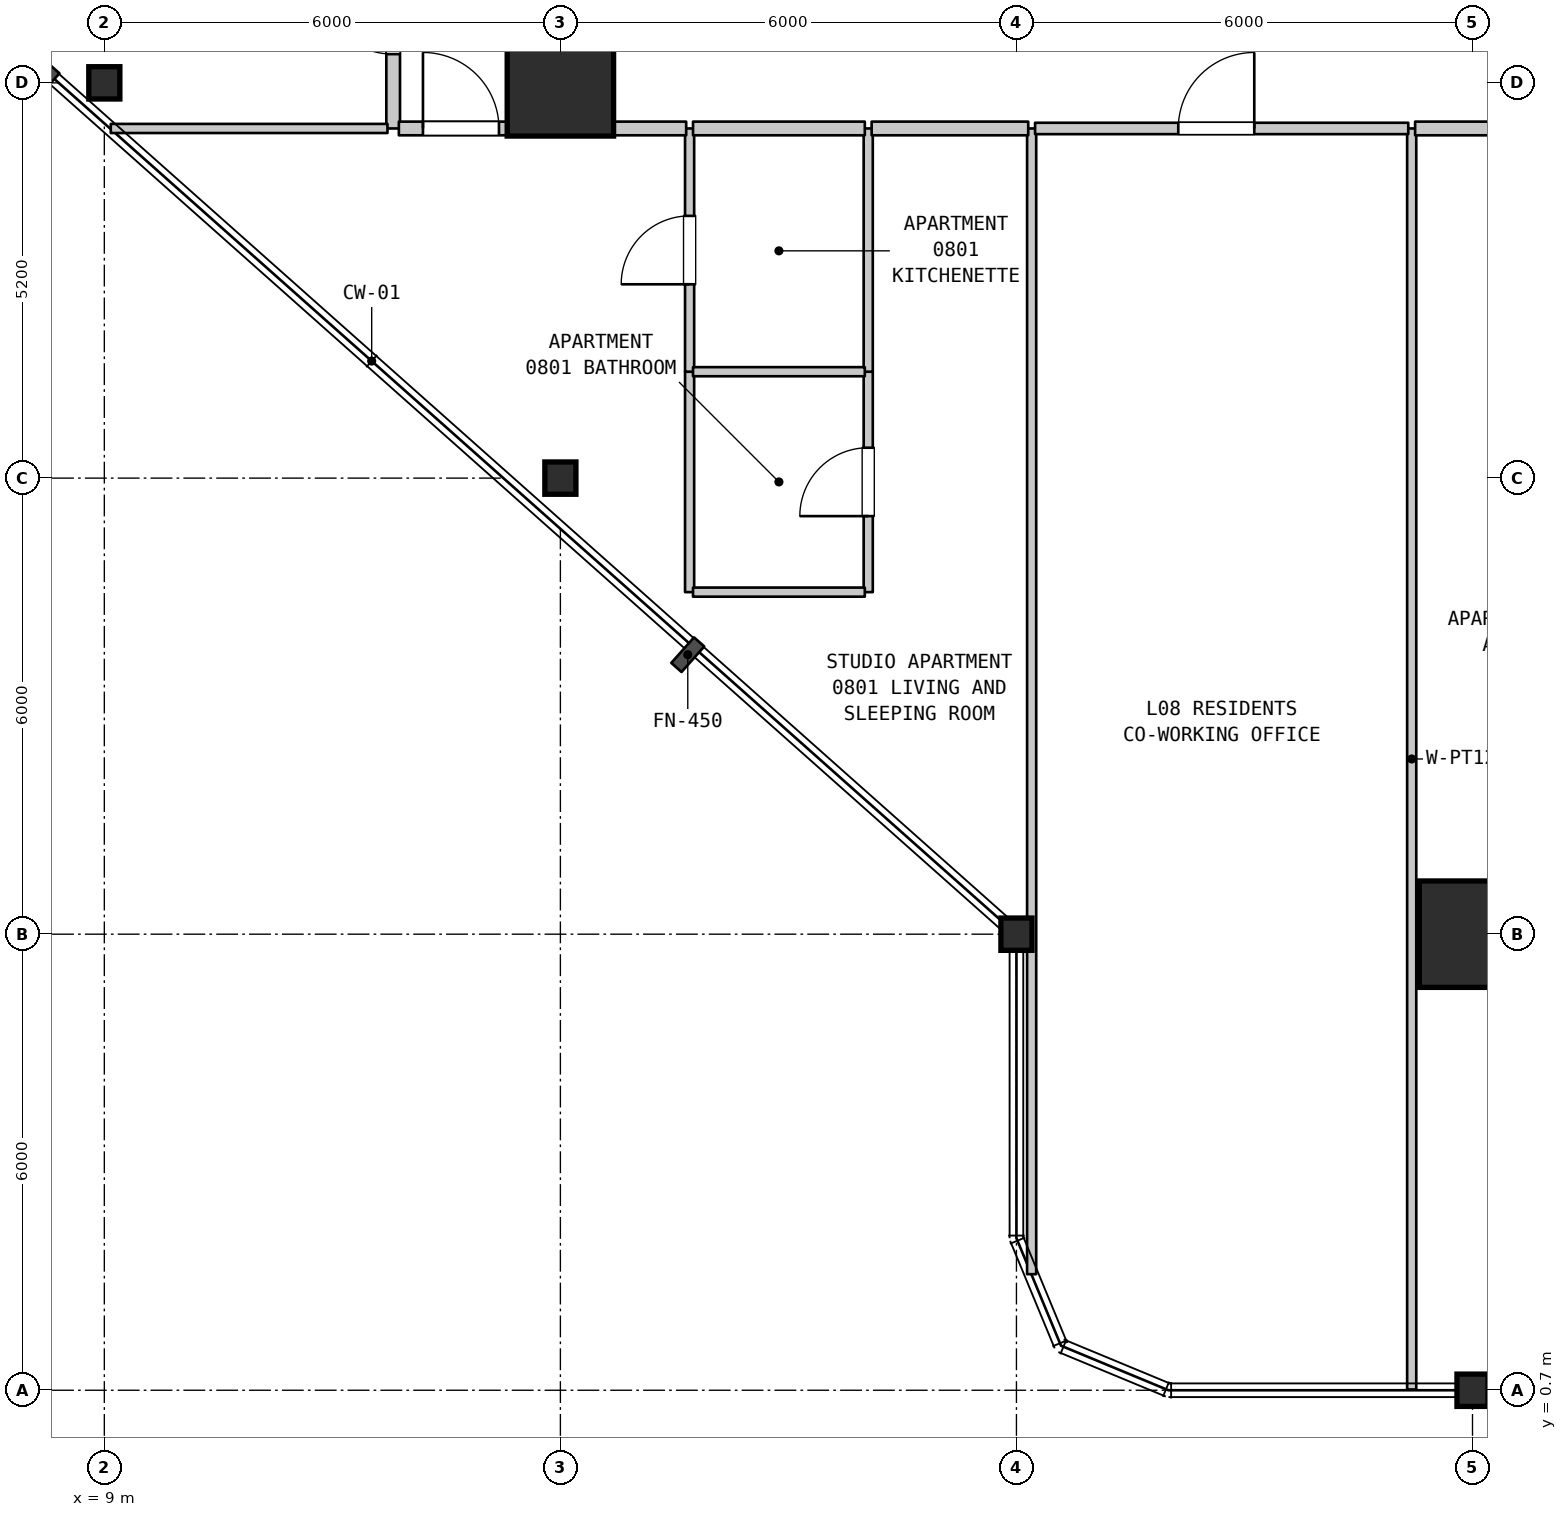
"""IFC4 building model, lengths in metres.
Left out: names, types, materials, properties, quantities, classifications, styles, units other than length and angle.
Written with IfcOpenShell. Run it as: python <this file> out.ifc"""

import sys

from ifc_helpers import new_model, si_unit, direction, frame, frame_2d, origin, origin_2d, place, context, subcontext, project, spatial, rectangle, i_section, extrude, element, fill, save


model = new_model("IFC4")
c1 = context("Model", 3, precision=1e-05, world=origin(), true_north=direction((0.0, 1.0)))
c2 = subcontext(c1, "Body", "Model", "MODEL_VIEW")
j1 = project(units=[si_unit("LENGTHUNIT", "METRE"), si_unit("PLANEANGLEUNIT", "RADIAN")], contexts=[c1])
p1 = place(None, origin())
s1 = spatial("IfcSite", under=j1, at=p1, CompositionType="ELEMENT")
p2 = place(p1, origin())
s2 = spatial("IfcBuilding", under=s1, at=p2, CompositionType="ELEMENT")
p3 = place(p2, frame((0.0, 0.0, 38.8)))
s3 = spatial("IfcBuildingStorey", under=s2, at=p3, CompositionType="ELEMENT", Elevation=38.8)
for number, where, z_axis, x_axis in (
    (1, (9.0, 17.9, 0.0), (0.0, 0.0, 1.0), (1.0, 0.0, 0.0)),
    (2, (15.0, 12.7, 0.0), (0.0, 0.0, 1.0), (1.0, 0.0, 0.0)),
):
    element("IfcColumn", number, at=place(p3, frame(where, z_axis=z_axis, x_axis=x_axis)), inside=s3, PredefinedType="COLUMN", context=c2, shape_type="SweptSolid", body=[
        extrude(i_section(OverallWidth=0.409, OverallDepth=0.425, WebThickness=0.032, FlangeThickness=0.052, FilletRadius=0.015, at=origin_2d()), origin(), (0.0, 0.0, 1.0), 3.7),
    ])
p4 = place(p3, frame((15.0, 17.9, 0.0), z_axis=(0.0, 0.0, 1.0), x_axis=(1.0, 0.0, 0.0)))
e3 = element("IfcColumn", 3, at=p4, inside=s3, PredefinedType="COLUMN", context=c2, shape_type="SweptSolid", body=[
    extrude(rectangle(XDim=1.4, YDim=1.4, at=origin_2d()), origin(), (0.0, 0.0, 1.0), 3.7),
])
for number, where, z_axis, x_axis in (
    (4, (21.0, 6.7, 0.0), (0.0, 0.0, 1.0), (1.0, 0.0, 0.0)),
    (5, (27.0, 0.7, 0.0), (0.0, 0.0, 1.0), (1.0, 0.0, 0.0)),
):
    element("IfcColumn", number, at=place(p3, frame(where, z_axis=z_axis, x_axis=x_axis)), inside=s3, PredefinedType="COLUMN", context=c2, shape_type="SweptSolid", body=[
        extrude(i_section(OverallWidth=0.409, OverallDepth=0.425, WebThickness=0.032, FlangeThickness=0.052, FilletRadius=0.015, at=origin_2d()), origin(), (0.0, 0.0, 1.0), 3.7),
    ])
p5 = place(p3, frame((27.0, 6.7, 0.0), z_axis=(0.0, 0.0, 1.0), x_axis=(1.0, 0.0, 0.0)))
e6 = element("IfcColumn", 6, at=p5, inside=s3, PredefinedType="COLUMN", context=c2, shape_type="SweptSolid", body=[
    extrude(rectangle(XDim=1.4, YDim=1.4, at=origin_2d()), origin(), (0.0, 0.0, 1.0), 3.7),
])
p6 = place(p3, frame((12.8, 17.3, 0.0), z_axis=(0.0, 0.0, 1.0), x_axis=(0.0, 1.0, 0.0)))
e7 = element("IfcWall", 7, at=p6, inside=s3, PredefinedType="STANDARD", context=c2, shape_type="SweptSolid", body=[
    extrude(rectangle(XDim=3.1, YDim=0.18, at=frame_2d((1.55, 0.0))), origin(), (0.0, 0.0, 1.0), 3.385),
])
p7 = place(p6, frame((0.978, 0.0, 0.0)))
e8 = element("IfcOpeningElement", 8, at=p7, cuts=e7, PredefinedType="OPENING", context=c2, shape_type="SweptSolid", body=[
    extrude(rectangle(XDim=1.0, YDim=2.15, at=frame_2d((0.5, 1.075))), frame((0.0, 0.1, 0.0), z_axis=(0.0, -1.0, 0.0), x_axis=(1.0, 0.0, 0.0)), (0.0, 0.0, 1.0), 0.2),
])
p8 = place(p3, frame((16.7, 11.2, 0.0), z_axis=(0.0, 0.0, 1.0), x_axis=(0.0, 1.0, 0.0)))
e9 = element("IfcWall", 9, at=p8, inside=s3, PredefinedType="PARTITIONING", context=c2, shape_type="SweptSolid", body=[
    extrude(rectangle(XDim=2.9, YDim=0.12, at=frame_2d((1.45, 0.0))), origin(), (0.0, 0.0, 1.0), 3.385),
])
p9 = place(p3, frame((16.7, 14.1, 0.0), z_axis=(0.0, 0.0, 1.0), x_axis=(0.0, 1.0, 0.0)))
e10 = element("IfcWall", 10, at=p9, inside=s3, PredefinedType="PARTITIONING", context=c2, shape_type="SweptSolid", body=[
    extrude(rectangle(XDim=3.2, YDim=0.12, at=frame_2d((1.6, 0.0))), origin(), (0.0, 0.0, 1.0), 3.385),
])
p10 = place(p9, frame((1.15, 0.0, 0.0)))
e11 = element("IfcOpeningElement", 11, at=p10, cuts=e10, PredefinedType="OPENING", context=c2, shape_type="SweptSolid", body=[
    extrude(rectangle(XDim=0.9, YDim=2.15, at=frame_2d((0.45, 1.075))), frame((0.0, 0.07, 0.0), z_axis=(0.0, -1.0, 0.0), x_axis=(1.0, 0.0, 0.0)), (0.0, 0.0, 1.0), 0.14),
])
p11 = place(p3, frame((19.05, 11.2, 0.0), z_axis=(0.0, 0.0, 1.0), x_axis=(0.0, 1.0, 0.0)))
e12 = element("IfcWall", 12, at=p11, inside=s3, PredefinedType="PARTITIONING", context=c2, shape_type="SweptSolid", body=[
    extrude(rectangle(XDim=2.9, YDim=0.12, at=frame_2d((1.45, 0.0))), origin(), (0.0, 0.0, 1.0), 3.385),
])
p12 = place(p11, frame((1.0, 0.0, 0.0)))
e13 = element("IfcOpeningElement", 13, at=p12, cuts=e12, PredefinedType="OPENING", context=c2, shape_type="SweptSolid", body=[
    extrude(rectangle(XDim=0.9, YDim=2.1, at=frame_2d((0.45, 1.05))), frame((0.0, 0.07, 0.0), z_axis=(0.0, -1.0, 0.0), x_axis=(1.0, 0.0, 0.0)), (0.0, 0.0, 1.0), 0.14),
])
p13 = place(p3, frame((19.05, 14.1, 0.0), z_axis=(0.0, 0.0, 1.0), x_axis=(0.0, 1.0, 0.0)))
e14 = element("IfcWall", 14, at=p13, inside=s3, PredefinedType="PARTITIONING", context=c2, shape_type="SweptSolid", body=[
    extrude(rectangle(XDim=3.2, YDim=0.12, at=frame_2d((1.6, 0.0))), origin(), (0.0, 0.0, 1.0), 3.385),
])
p14 = place(p3, frame((21.2, 2.227, 0.0), z_axis=(0.0, 0.0, 1.0), x_axis=(0.0, 1.0, 0.0)))
e15 = element("IfcWall", 15, at=p14, inside=s3, PredefinedType="PARTITIONING", context=c2, shape_type="SweptSolid", body=[
    extrude(rectangle(XDim=15.073, YDim=0.12, at=frame_2d((7.537, 0.0))), origin(), (0.0, 0.0, 1.0), 3.385),
])
p15 = place(p3, frame((26.2, 0.71, 0.0), z_axis=(0.0, 0.0, 1.0), x_axis=(0.0, 1.0, 0.0)))
e16 = element("IfcWall", 16, at=p15, inside=s3, PredefinedType="PARTITIONING", context=c2, shape_type="SweptSolid", body=[
    extrude(rectangle(XDim=16.59, YDim=0.12, at=frame_2d((8.295, 0.0))), origin(), (0.0, 0.0, 1.0), 3.385),
])
for number, where, z_axis, x_axis in (
    (17, (16.745, 11.2, 0.0), (0.0, 0.0, 1.0), (1.0, 0.0, 0.0)),
    (18, (16.745, 14.1, 0.0), (0.0, 0.0, 1.0), (1.0, 0.0, 0.0)),
):
    element("IfcWall", number, at=place(p3, frame(where, z_axis=z_axis, x_axis=x_axis)), inside=s3, PredefinedType="PARTITIONING", context=c2, shape_type="SweptSolid", body=[
        extrude(rectangle(XDim=2.26, YDim=0.12, at=frame_2d((1.13, 0.0))), origin(), (0.0, 0.0, 1.0), 3.385),
    ])
p16 = place(p3, frame((9.085, 17.3, 0.0), z_axis=(0.0, 0.0, 1.0), x_axis=(1.0, 0.0, 0.0)))
e19 = element("IfcWall", 19, at=p16, inside=s3, PredefinedType="PARTITIONING", context=c2, shape_type="SweptSolid", body=[
    extrude(rectangle(XDim=3.64, YDim=0.12, at=frame_2d((1.82, 0.0))), origin(), (0.0, 0.0, 1.0), 3.385),
])
p17 = place(p3, frame((12.875, 17.3, 0.0), z_axis=(0.0, 0.0, 1.0), x_axis=(1.0, 0.0, 0.0)))
e20 = element("IfcWall", 20, at=p17, inside=s3, PredefinedType="STANDARD", context=c2, shape_type="SweptSolid", body=[
    extrude(rectangle(XDim=3.78, YDim=0.18, at=frame_2d((1.89, 0.0))), origin(), (0.0, 0.0, 1.0), 3.385),
])
p18 = place(p17, frame((0.317, 0.0, 0.0)))
e21 = element("IfcOpeningElement", 21, at=p18, cuts=e20, PredefinedType="OPENING", context=c2, shape_type="SweptSolid", body=[
    extrude(rectangle(XDim=1.0, YDim=2.15, at=frame_2d((0.5, 1.075))), frame((0.0, 0.1, 0.0), z_axis=(0.0, -1.0, 0.0), x_axis=(1.0, 0.0, 0.0)), (0.0, 0.0, 1.0), 0.2),
])
p19 = place(p3, frame((16.745, 17.3, 0.0), z_axis=(0.0, 0.0, 1.0), x_axis=(1.0, 0.0, 0.0)))
e22 = element("IfcWall", 22, at=p19, inside=s3, PredefinedType="STANDARD", context=c2, shape_type="SweptSolid", body=[
    extrude(rectangle(XDim=2.26, YDim=0.18, at=frame_2d((1.13, 0.0))), origin(), (0.0, 0.0, 1.0), 3.385),
])
p20 = place(p3, frame((19.095, 17.3, 0.0), z_axis=(0.0, 0.0, 1.0), x_axis=(1.0, 0.0, 0.0)))
e23 = element("IfcWall", 23, at=p20, inside=s3, PredefinedType="STANDARD", context=c2, shape_type="SweptSolid", body=[
    extrude(rectangle(XDim=2.06, YDim=0.18, at=frame_2d((1.03, 0.0))), origin(), (0.0, 0.0, 1.0), 3.385),
])
p21 = place(p3, frame((21.245, 17.3, 0.0), z_axis=(0.0, 0.0, 1.0), x_axis=(1.0, 0.0, 0.0)))
e24 = element("IfcWall", 24, at=p21, inside=s3, PredefinedType="STANDARD", context=c2, shape_type="SweptSolid", body=[
    extrude(rectangle(XDim=4.91, YDim=0.15, at=frame_2d((2.455, 0.0))), origin(), (0.0, 0.0, 1.0), 3.385),
])
p22 = place(p21, frame((1.884, 0.0, 0.0)))
e25 = element("IfcOpeningElement", 25, at=p22, cuts=e24, PredefinedType="OPENING", context=c2, shape_type="SweptSolid", body=[
    extrude(rectangle(XDim=1.0, YDim=2.15, at=frame_2d((0.5, 1.075))), frame((0.0, 0.085, 0.0), z_axis=(0.0, -1.0, 0.0), x_axis=(1.0, 0.0, 0.0)), (0.0, 0.0, 1.0), 0.17),
])
p23 = place(p3, frame((26.245, 17.3, 0.0), z_axis=(0.0, 0.0, 1.0), x_axis=(1.0, 0.0, 0.0)))
e26 = element("IfcWall", 26, at=p23, inside=s3, PredefinedType="STANDARD", context=c2, shape_type="SweptSolid", body=[
    extrude(rectangle(XDim=4.01, YDim=0.18, at=frame_2d((2.005, 0.0))), origin(), (0.0, 0.0, 1.0), 3.385),
])
p24 = place(p23, frame((1.505, 0.0, 0.0)))
e27 = element("IfcOpeningElement", 27, at=p24, cuts=e26, PredefinedType="OPENING", context=c2, shape_type="SweptSolid", body=[
    extrude(rectangle(XDim=1.0, YDim=2.15, at=frame_2d((0.5, 1.075))), frame((0.0, 0.1, 0.0), z_axis=(0.0, -1.0, 0.0), x_axis=(1.0, 0.0, 0.0)), (0.0, 0.0, 1.0), 0.2),
])
p25 = place(p7, origin())
e28 = element("IfcDoor", 28, at=p25, inside=s3, OperationType="SINGLE_SWING_RIGHT", PredefinedType="DOOR", context=c2, shape_type="SweptSolid", body=[
    extrude(rectangle(XDim=1.0, YDim=2.15, at=frame_2d((0.5, 1.075))), frame((0.0, 0.025, 0.0), z_axis=(0.0, -1.0, 0.0), x_axis=(1.0, 0.0, 0.0)), (0.0, 0.0, 1.0), 0.05),
])
fill(e8, e28)
p26 = place(p10, origin())
e29 = element("IfcDoor", 29, at=p26, inside=s3, OperationType="SINGLE_SWING_LEFT", PredefinedType="DOOR", context=c2, shape_type="SweptSolid", body=[
    extrude(rectangle(XDim=0.9, YDim=2.15, at=frame_2d((0.45, 1.075))), frame((0.0, 0.025, 0.0), z_axis=(0.0, -1.0, 0.0), x_axis=(1.0, 0.0, 0.0)), (0.0, 0.0, 1.0), 0.05),
])
fill(e11, e29)
p27 = place(p12, origin())
e30 = element("IfcDoor", 30, at=p27, inside=s3, OperationType="SINGLE_SWING_LEFT", PredefinedType="DOOR", context=c2, shape_type="SweptSolid", body=[
    extrude(rectangle(XDim=0.9, YDim=2.1, at=frame_2d((0.45, 1.05))), frame((0.0, 0.025, 0.0), z_axis=(0.0, -1.0, 0.0), x_axis=(1.0, 0.0, 0.0)), (0.0, 0.0, 1.0), 0.05),
])
fill(e13, e30)
p28 = place(p18, origin())
e31 = element("IfcDoor", 31, at=p28, inside=s3, OperationType="SINGLE_SWING_LEFT", PredefinedType="DOOR", context=c2, shape_type="SweptSolid", body=[
    extrude(rectangle(XDim=1.0, YDim=2.15, at=frame_2d((0.5, 1.075))), frame((0.0, 0.025, 0.0), z_axis=(0.0, -1.0, 0.0), x_axis=(1.0, 0.0, 0.0)), (0.0, 0.0, 1.0), 0.05),
])
fill(e21, e31)
p29 = place(p22, origin())
e32 = element("IfcDoor", 32, at=p29, inside=s3, OperationType="SINGLE_SWING_RIGHT", PredefinedType="DOOR", context=c2, shape_type="SweptSolid", body=[
    extrude(rectangle(XDim=1.0, YDim=2.15, at=frame_2d((0.5, 1.075))), frame((0.0, 0.025, 0.0), z_axis=(0.0, -1.0, 0.0), x_axis=(1.0, 0.0, 0.0)), (0.0, 0.0, 1.0), 0.05),
])
fill(e25, e32)
save(model, sys.argv[1])
